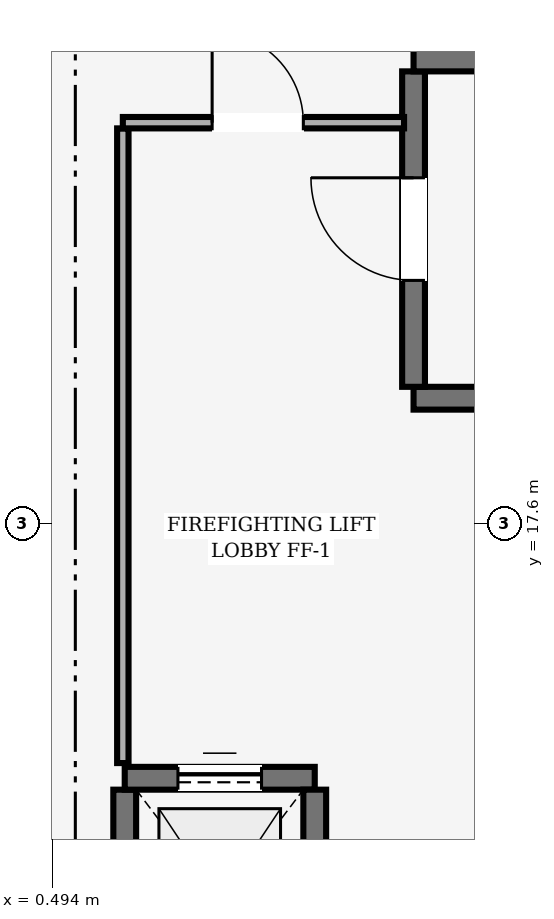
"""IFC4 building model, lengths in metres.
Left out: names, types, materials, properties, quantities, classifications, styles, units other than length and angle.
Written with IfcOpenShell. Run it as: python <this file> out.ifc"""

import sys

from ifc_helpers import new_model, si_unit, direction, frame, frame_2d, origin, place, context, subcontext, project, spatial, rectangle, extrude, element, fill, save


model = new_model("IFC4")
c1 = context("Model", 3, precision=1e-05, world=origin(), true_north=direction((0.0, 1.0)))
c2 = subcontext(c1, "Body", "Model", "MODEL_VIEW")
j1 = project(units=[si_unit("LENGTHUNIT", "METRE"), si_unit("PLANEANGLEUNIT", "RADIAN")], contexts=[c1])
p1 = place(None, origin())
s1 = spatial("IfcSite", under=j1, at=p1, CompositionType="ELEMENT")
p2 = place(p1, origin())
s2 = spatial("IfcBuilding", under=s1, at=p2, CompositionType="ELEMENT")
p3 = place(p2, frame((0.0, 0.0, 12.0)))
s3 = spatial("IfcBuildingStorey", under=s2, at=p3, CompositionType="ELEMENT", Elevation=12.0)
p4 = place(p3, frame((15.43, 19.25, 0.0), z_axis=(0.0, 0.0, 1.0), x_axis=(-1.0, 0.0, 0.0)))
e1 = element("IfcWall", 1, at=p4, inside=s3, PredefinedType="SHEAR", context=c2, shape_type="SweptSolid", body=[
    extrude(rectangle(XDim=10.18, YDim=0.3, at=frame_2d((5.09, 0.0))), origin(), (0.0, 0.0, 1.0), 3.35),
])
p5 = place(p3, frame((5.25, 19.4, 0.0), z_axis=(0.0, 0.0, 1.0), x_axis=(0.0, 1.0, 0.0)))
e2 = element("IfcWall", 2, at=p5, inside=s3, PredefinedType="SHEAR", context=c2, shape_type="SweptSolid", body=[
    extrude(rectangle(XDim=4.15, YDim=0.3, at=frame_2d((2.075, 0.0))), origin(), (0.0, 0.0, 1.0), 3.35),
])
p6 = place(p5, frame((1.4, 0.0, 0.0)))
e3 = element("IfcOpeningElement", 3, at=p6, cuts=e2, PredefinedType="OPENING", context=c2, shape_type="SweptSolid", body=[
    extrude(rectangle(XDim=1.35, YDim=2.2, at=frame_2d((0.675, 1.1))), frame((0.0, 0.15, 0.0), z_axis=(0.0, -1.0, 0.0), x_axis=(1.0, 0.0, 0.0)), (0.0, 0.0, 1.0), 0.3),
])
p7 = place(p3, frame((5.25, 23.7, 0.0), z_axis=(0.0, 0.0, 1.0), x_axis=(1.0, 0.0, 0.0)))
e4 = element("IfcWall", 4, at=p7, inside=s3, PredefinedType="SHEAR", context=c2, shape_type="SweptSolid", body=[
    extrude(rectangle(XDim=10.18, YDim=0.3, at=frame_2d((5.09, 0.0))), origin(), (0.0, 0.0, 1.0), 3.35),
])
p8 = place(p3, frame((1.45, 11.2, 0.0), z_axis=(0.0, 0.0, 1.0), x_axis=(0.0, 1.0, 0.0)))
e5 = element("IfcWall", 5, at=p8, inside=s3, PredefinedType="SHEAR", context=c2, shape_type="SweptSolid", body=[
    extrude(rectangle(XDim=2.9, YDim=0.3, at=frame_2d((1.45, 0.0))), origin(), (0.0, 0.0, 1.0), 3.35),
])
p9 = place(p3, frame((1.45, 14.25, 0.0), z_axis=(0.0, 0.0, 1.0), x_axis=(1.0, 0.0, 0.0)))
e6 = element("IfcWall", 6, at=p9, inside=s3, PredefinedType="SHEAR", context=c2, shape_type="SweptSolid", body=[
    extrude(rectangle(XDim=2.5, YDim=0.3, at=frame_2d((1.25, 0.0))), origin(), (0.0, 0.0, 1.0), 3.35),
])
p10 = place(p9, frame((0.7, 0.0, 0.0)))
e7 = element("IfcOpeningElement", 7, at=p10, cuts=e6, PredefinedType="OPENING", context=c2, shape_type="SweptSolid", body=[
    extrude(rectangle(XDim=1.1, YDim=2.1, at=frame_2d((0.55, 1.05))), frame((0.0, 0.15, 0.0), z_axis=(0.0, -1.0, 0.0), x_axis=(1.0, 0.0, 0.0)), (0.0, 0.0, 1.0), 0.3),
])
p11 = place(p3, frame((3.95, 14.1, 0.0), z_axis=(0.0, 0.0, 1.0), x_axis=(0.0, -1.0, 0.0)))
e8 = element("IfcWall", 8, at=p11, inside=s3, PredefinedType="SHEAR", context=c2, shape_type="SweptSolid", body=[
    extrude(rectangle(XDim=2.9, YDim=0.3, at=frame_2d((1.45, 0.0))), origin(), (0.0, 0.0, 1.0), 3.35),
])
p12 = place(p3, frame((1.425, 14.45, 0.0), z_axis=(0.0, 0.0, 1.0), x_axis=(0.0, 1.0, 0.0)))
e9 = element("IfcWall", 9, at=p12, inside=s3, PredefinedType="PARTITIONING", context=c2, shape_type="SweptSolid", body=[
    extrude(rectangle(XDim=8.35, YDim=0.15, at=frame_2d((4.175, 0.0))), origin(), (0.0, 0.0, 1.0), 3.33),
])
p13 = place(p3, frame((1.425, 22.875, 0.0), z_axis=(0.0, 0.0, 1.0), x_axis=(1.0, 0.0, 0.0)))
e10 = element("IfcWall", 10, at=p13, inside=s3, PredefinedType="PARTITIONING", context=c2, shape_type="SweptSolid", body=[
    extrude(rectangle(XDim=3.7, YDim=0.15, at=frame_2d((1.85, 0.0))), origin(), (0.0, 0.0, 1.0), 3.33),
])
p14 = place(p13, frame((1.175, 0.0, 0.0)))
e11 = element("IfcOpeningElement", 11, at=p14, cuts=e10, PredefinedType="OPENING", context=c2, shape_type="SweptSolid", body=[
    extrude(rectangle(XDim=1.2, YDim=2.15, at=frame_2d((0.6, 1.075))), frame((0.0, 0.075, 0.0), z_axis=(0.0, -1.0, 0.0), x_axis=(1.0, 0.0, 0.0)), (0.0, 0.0, 1.0), 0.15),
])
p15 = place(p6, origin())
e12 = element("IfcDoor", 12, at=p15, inside=s3, OperationType="SINGLE_SWING_RIGHT", PredefinedType="DOOR", context=c2, shape_type="SweptSolid", body=[
    extrude(rectangle(XDim=1.35, YDim=2.2, at=frame_2d((0.675, 1.1))), frame((0.0, 0.025, 0.0), z_axis=(0.0, -1.0, 0.0), x_axis=(1.0, 0.0, 0.0)), (0.0, 0.0, 1.0), 0.05),
])
fill(e3, e12)
p16 = place(p10, origin())
e13 = element("IfcDoor", 13, at=p16, inside=s3, OperationType="SLIDING_TO_LEFT", PredefinedType="DOOR", context=c2, shape_type="SweptSolid", body=[
    extrude(rectangle(XDim=1.1, YDim=2.1, at=frame_2d((0.55, 1.05))), frame((0.0, 0.025, 0.0), z_axis=(0.0, -1.0, 0.0), x_axis=(1.0, 0.0, 0.0)), (0.0, 0.0, 1.0), 0.05),
])
fill(e7, e13)
p17 = place(p14, origin())
e14 = element("IfcDoor", 14, at=p17, inside=s3, OperationType="SINGLE_SWING_LEFT", PredefinedType="DOOR", context=c2, shape_type="SweptSolid", body=[
    extrude(rectangle(XDim=1.2, YDim=2.15, at=frame_2d((0.6, 1.075))), frame((0.0, 0.025, 0.0), z_axis=(0.0, -1.0, 0.0), x_axis=(1.0, 0.0, 0.0)), (0.0, 0.0, 1.0), 0.05),
])
fill(e11, e14)
save(model, sys.argv[1])
